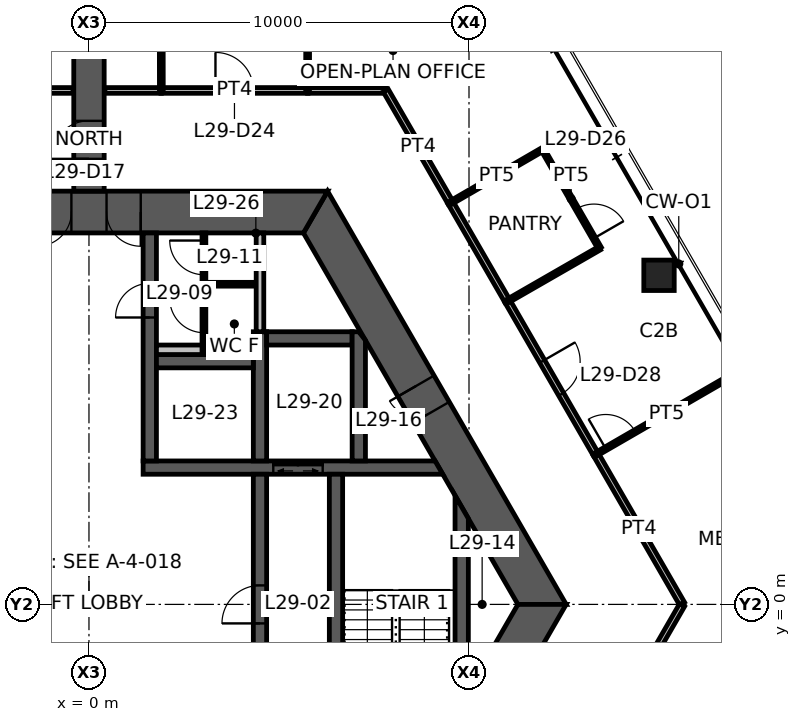
"""IFC4 building model, lengths in metres.
Left out: names, types, materials, properties, quantities, classifications, styles, units other than length and angle.
Written with IfcOpenShell. Run it as: python <this file> out.ifc"""

import sys

from ifc_helpers import new_model, si_unit, direction, frame, frame_2d, origin, origin_2d, place, context, subcontext, project, spatial, polyline, rectangle, hollow_rectangle, outline, extrude, element, fill, save


model = new_model("IFC4")
c1 = context("Model", 3, precision=1e-05, world=origin(), true_north=direction((0.0, 1.0)))
c2 = subcontext(c1, "Body", "Model", "MODEL_VIEW")
j1 = project(units=[si_unit("LENGTHUNIT", "METRE"), si_unit("PLANEANGLEUNIT", "RADIAN")], contexts=[c1])
p1 = place(None, origin())
s1 = spatial("IfcSite", under=j1, at=p1, CompositionType="ELEMENT")
p2 = place(p1, origin())
s2 = spatial("IfcBuilding", under=s1, at=p2, CompositionType="ELEMENT")
p3 = place(p2, frame((0.0, 0.0, 115.8)))
s3 = spatial("IfcBuildingStorey", under=s2, at=p3, CompositionType="ELEMENT", Elevation=115.8)
p4 = place(p3, frame((15.0, 8.66, 0.0), z_axis=(0.0, 0.0, 1.0), x_axis=(1.0, 0.0, 0.0)))
e1 = element("IfcColumn", 1, at=p4, inside=s3, PredefinedType="COLUMN", context=c2, shape_type="SweptSolid", body=[
    extrude(hollow_rectangle(XDim=0.8, YDim=0.8, WallThickness=0.045, at=origin_2d()), origin(), (0.0, 0.0, 1.0), 3.9),
])
p5 = place(p3, frame((11.922, 0.0, 0.0), z_axis=(0.0, 0.0, 1.0), x_axis=(-0.500004296715, 0.866022923061, 0.0)))
e2 = element("IfcWall", 2, at=p5, inside=s3, PredefinedType="SHEAR", context=c2, shape_type="SweptSolid", body=[
    extrude(outline(polyline([(-0.318, -0.55), (5.835, -0.55), (6.635, -0.55), (12.24, -0.55), (11.605, 0.55), (6.635, 0.55), (5.835, 0.55), (0.318, 0.55), (-0.318, -0.55)])), origin(), (0.0, 0.0, 1.0), 3.9),
])
p6 = place(p5, frame((5.835, 0.0, 0.0)))
e3 = element("IfcOpeningElement", 3, at=p6, cuts=e2, PredefinedType="OPENING", context=c2, shape_type="SweptSolid", body=[
    extrude(rectangle(XDim=0.8, YDim=2.1, at=frame_2d((0.4, 1.05))), frame((0.0, 0.56, 0.0), z_axis=(0.0, -1.0, 0.0), x_axis=(1.0, 0.0, 0.0)), (0.0, 0.0, 1.0), 1.12),
])
p7 = place(p3, frame((5.961, 10.325, 0.0), z_axis=(0.0, 0.0, 1.0), x_axis=(-1.0, 0.0, 0.0)))
e4 = element("IfcWall", 4, at=p7, inside=s3, PredefinedType="SHEAR", context=c2, shape_type="SweptSolid", body=[
    extrude(outline(polyline([(-0.318, -0.55), (4.599, -0.55), (5.499, -0.55), (6.424, -0.55), (7.323, -0.55), (12.24, -0.55), (11.605, 0.55), (7.323, 0.55), (6.424, 0.55), (5.499, 0.55), (4.599, 0.55), (0.318, 0.55), (-0.318, -0.55)])), origin(), (0.0, 0.0, 1.0), 3.9),
])
p8 = place(p7, frame((6.424, 0.0, 0.0)))
e5 = element("IfcOpeningElement", 5, at=p8, cuts=e4, PredefinedType="OPENING", context=c2, shape_type="SweptSolid", body=[
    extrude(rectangle(XDim=0.9, YDim=2.1, at=frame_2d((0.45, 1.05))), frame((0.0, 0.56, 0.0), z_axis=(0.0, -1.0, 0.0), x_axis=(1.0, 0.0, 0.0)), (0.0, 0.0, 1.0), 1.12),
])
p9 = place(p7, frame((4.599, 0.0, 0.0)))
e6 = element("IfcOpeningElement", 6, at=p9, cuts=e4, PredefinedType="OPENING", context=c2, shape_type="SweptSolid", body=[
    extrude(rectangle(XDim=0.9, YDim=2.1, at=frame_2d((0.45, 1.05))), frame((0.0, 0.56, 0.0), z_axis=(0.0, -1.0, 0.0), x_axis=(1.0, 0.0, 0.0)), (0.0, 0.0, 1.0), 1.12),
])
p10 = place(p3, frame((5.961, -10.325, 0.0), z_axis=(0.0, 0.0, 1.0), x_axis=(0.500004296715, 0.866022923061, 0.0)))
e7 = element("IfcWall", 7, at=p10, inside=s3, PredefinedType="SHEAR", context=c2, shape_type="SweptSolid", body=[
    extrude(outline(polyline([(-0.318, -0.55), (4.594, -0.55), (5.394, -0.55), (12.24, -0.55), (11.605, 0.55), (5.394, 0.55), (4.594, 0.55), (0.318, 0.55), (-0.318, -0.55)])), origin(), (0.0, 0.0, 1.0), 3.9),
])
p11 = place(p10, frame((4.594, 0.0, 0.0)))
e8 = element("IfcOpeningElement", 8, at=p11, cuts=e7, PredefinedType="OPENING", context=c2, shape_type="SweptSolid", body=[
    extrude(rectangle(XDim=0.8, YDim=2.1, at=frame_2d((0.4, 1.05))), frame((0.0, 0.56, 0.0), z_axis=(0.0, -1.0, 0.0), x_axis=(1.0, 0.0, 0.0)), (0.0, 0.0, 1.0), 1.12),
])
p12 = place(p3, frame((0.0, 10.875, 0.0), z_axis=(0.0, 0.0, 1.0), x_axis=(0.0, 1.0, 0.0)))
e9 = element("IfcWall", 9, at=p12, inside=s3, PredefinedType="SHEAR", context=c2, shape_type="SweptSolid", body=[
    extrude(rectangle(XDim=7.646, YDim=0.8, at=frame_2d((3.823, 0.0))), origin(), (0.0, 0.0, 1.0), 3.9),
])
p13 = place(p12, frame((0.85, 0.0, 0.0)))
e10 = element("IfcOpeningElement", 10, at=p13, cuts=e9, PredefinedType="OPENING", context=c2, shape_type="SweptSolid", body=[
    extrude(rectangle(XDim=1.0, YDim=2.1, at=frame_2d((0.5, 1.05))), frame((0.0, 0.41, 0.0), z_axis=(0.0, -1.0, 0.0), x_axis=(1.0, 0.0, 0.0)), (0.0, 0.0, 1.0), 0.82),
])
p14 = place(p3, frame((1.425, 3.6, 0.0), z_axis=(0.0, 0.0, 1.0), x_axis=(1.0, 0.0, 0.0)))
e11 = element("IfcWall", 11, at=p14, inside=s3, PredefinedType="SHEAR", context=c2, shape_type="SweptSolid", body=[
    extrude(outline(polyline([(0.0, -0.175), (3.425, -0.175), (4.725, -0.175), (7.885, -0.175), (7.683, 0.175), (4.725, 0.175), (3.425, 0.175), (0.0, 0.175), (0.0, -0.175)])), origin(), (0.0, 0.0, 1.0), 3.9),
])
p15 = place(p14, frame((3.425, 0.0, 0.0)))
e12 = element("IfcOpeningElement", 12, at=p15, cuts=e11, PredefinedType="OPENING", context=c2, shape_type="SweptSolid", body=[
    extrude(rectangle(XDim=1.3, YDim=2.1, at=frame_2d((0.65, 1.05))), frame((0.0, 0.185, 0.0), z_axis=(0.0, -1.0, 0.0), x_axis=(1.0, 0.0, 0.0)), (0.0, 0.0, 1.0), 0.37),
])
p16 = place(p3, frame((1.6, 3.775, 0.0), z_axis=(0.0, 0.0, 1.0), x_axis=(0.0, 1.0, 0.0)))
e13 = element("IfcWall", 13, at=p16, inside=s3, PredefinedType="SHEAR", context=c2, shape_type="SweptSolid", body=[
    extrude(rectangle(XDim=6.0, YDim=0.35, at=frame_2d((3.0, 0.0))), origin(), (0.0, 0.0, 1.0), 3.9),
])
p17 = place(p16, frame((3.775, 0.0, 0.0)))
e14 = element("IfcOpeningElement", 14, at=p17, cuts=e13, PredefinedType="OPENING", context=c2, shape_type="SweptSolid", body=[
    extrude(rectangle(XDim=0.9, YDim=2.1, at=frame_2d((0.45, 1.05))), frame((0.0, 0.185, 0.0), z_axis=(0.0, -1.0, 0.0), x_axis=(1.0, 0.0, 0.0)), (0.0, 0.0, 1.0), 0.37),
])
p18 = place(p3, frame((4.5, -3.425, 0.0), z_axis=(0.0, 0.0, 1.0), x_axis=(0.0, 1.0, 0.0)))
e15 = element("IfcWall", 15, at=p18, inside=s3, PredefinedType="SHEAR", context=c2, shape_type="SweptSolid", body=[
    extrude(rectangle(XDim=6.85, YDim=0.35, at=frame_2d((3.425, 0.0))), origin(), (0.0, 0.0, 1.0), 3.9),
])
p19 = place(p18, frame((2.925, 0.0, 0.0)))
e16 = element("IfcOpeningElement", 16, at=p19, cuts=e15, PredefinedType="OPENING", context=c2, shape_type="SweptSolid", body=[
    extrude(rectangle(XDim=1.0, YDim=2.1, at=frame_2d((0.5, 1.05))), frame((0.0, 0.185, 0.0), z_axis=(0.0, -1.0, 0.0), x_axis=(1.0, 0.0, 0.0)), (0.0, 0.0, 1.0), 0.37),
])
p20 = place(p3, frame((6.5, -3.425, 0.0), z_axis=(0.0, 0.0, 1.0), x_axis=(0.0, 1.0, 0.0)))
e17 = element("IfcWall", 17, at=p20, inside=s3, PredefinedType="SHEAR", context=c2, shape_type="SweptSolid", body=[
    extrude(rectangle(XDim=6.85, YDim=0.35, at=frame_2d((3.425, 0.0))), origin(), (0.0, 0.0, 1.0), 3.9),
])
p21 = place(p20, frame((0.1, 0.0, 0.0)))
e18 = element("IfcOpeningElement", 18, at=p21, cuts=e17, PredefinedType="OPENING", context=c2, shape_type="SweptSolid", body=[
    extrude(rectangle(XDim=1.0, YDim=2.1, at=frame_2d((0.5, 1.05))), frame((0.0, 0.185, 0.0), z_axis=(0.0, -1.0, 0.0), x_axis=(1.0, 0.0, 0.0)), (0.0, 0.0, 1.0), 0.37),
])
p22 = place(p3, frame((4.5, 3.775, 0.0), z_axis=(0.0, 0.0, 1.0), x_axis=(0.0, 1.0, 0.0)))
e19 = element("IfcWall", 19, at=p22, inside=s3, PredefinedType="SHEAR", context=c2, shape_type="SweptSolid", body=[
    extrude(rectangle(XDim=3.4, YDim=0.35, at=frame_2d((1.7, 0.0))), origin(), (0.0, 0.0, 1.0), 3.9),
])
p23 = place(p3, frame((1.775, 6.4, 0.0), z_axis=(0.0, 0.0, 1.0), x_axis=(1.0, 0.0, 0.0)))
e20 = element("IfcWall", 20, at=p23, inside=s3, PredefinedType="SHEAR", context=c2, shape_type="SweptSolid", body=[
    extrude(rectangle(XDim=2.55, YDim=0.35, at=frame_2d((1.275, 0.0))), origin(), (0.0, 0.0, 1.0), 3.9),
])
p24 = place(p3, frame((4.675, 7.0, 0.0), z_axis=(0.0, 0.0, 1.0), x_axis=(1.0, 0.0, 0.0)))
e21 = element("IfcWall", 21, at=p24, inside=s3, PredefinedType="SHEAR", context=c2, shape_type="SweptSolid", body=[
    extrude(rectangle(XDim=2.25, YDim=0.35, at=frame_2d((1.125, 0.0))), origin(), (0.0, 0.0, 1.0), 3.9),
])
p25 = place(p3, frame((7.1, 3.775, 0.0), z_axis=(0.0, 0.0, 1.0), x_axis=(0.0, 1.0, 0.0)))
e22 = element("IfcWall", 22, at=p25, inside=s3, PredefinedType="SHEAR", context=c2, shape_type="SweptSolid", body=[
    extrude(outline(polyline([(0.0, -0.175), (3.175, -0.175), (3.4, 0.0), (3.4, 0.175), (0.0, 0.175), (0.0, -0.175)])), origin(), (0.0, 0.0, 1.0), 3.9),
])
p26 = place(p3, frame((9.808, -2.562, 0.0), z_axis=(0.0, 0.0, 1.0), x_axis=(0.0, 1.0, 0.0)))
e23 = element("IfcWall", 23, at=p26, inside=s3, PredefinedType="SHEAR", context=c2, shape_type="SweptSolid", body=[
    extrude(outline(polyline([(0.303, -0.175), (4.821, -0.175), (5.428, 0.175), (-0.303, 0.175), (0.303, -0.175)])), origin(), (0.0, 0.0, 1.0), 3.9),
])
p27 = place(p3, frame((4.5, 7.175, 0.0), z_axis=(0.0, 0.0, 1.0), x_axis=(0.0, 1.0, 0.0)))
e24 = element("IfcWall", 24, at=p27, inside=s3, PredefinedType="STANDARD", context=c2, shape_type="SweptSolid", body=[
    extrude(rectangle(XDim=2.6, YDim=0.2, at=frame_2d((1.3, 0.0))), origin(), (0.0, 0.0, 1.0), 3.9),
])
p28 = place(p3, frame((1.775, 6.7, 0.0), z_axis=(0.0, 0.0, 1.0), x_axis=(1.0, 0.0, 0.0)))
e25 = element("IfcWall", 25, at=p28, inside=s3, PredefinedType="PLUMBINGWALL", context=c2, shape_type="SweptSolid", body=[
    extrude(rectangle(XDim=2.55, YDim=0.25, at=frame_2d((1.275, 0.0))), origin(), (0.0, 0.0, 1.0), 3.9),
])
p29 = place(p3, frame((3.025, 6.575, 0.0), z_axis=(0.0, 0.0, 1.0), x_axis=(0.0, 1.0, 0.0)))
e26 = element("IfcWall", 26, at=p29, inside=s3, PredefinedType="PARTITIONING", context=c2, shape_type="SweptSolid", body=[
    extrude(rectangle(XDim=3.2, YDim=0.1, at=frame_2d((1.6, 0.0))), origin(), (0.0, 0.0, 1.0), 2.95),
])
p30 = place(p29, frame((0.575, 0.0, 0.0)))
e27 = element("IfcOpeningElement", 27, at=p30, cuts=e26, PredefinedType="OPENING", context=c2, shape_type="SweptSolid", body=[
    extrude(rectangle(XDim=0.9, YDim=2.1, at=frame_2d((0.45, 1.05))), frame((0.0, 0.06, 0.0), z_axis=(0.0, -1.0, 0.0), x_axis=(1.0, 0.0, 0.0)), (0.0, 0.0, 1.0), 0.12),
])
p31 = place(p29, frame((2.1, 0.0, 0.0)))
e28 = element("IfcOpeningElement", 28, at=p31, cuts=e26, PredefinedType="OPENING", context=c2, shape_type="SweptSolid", body=[
    extrude(rectangle(XDim=0.9, YDim=2.1, at=frame_2d((0.45, 1.05))), frame((0.0, 0.06, 0.0), z_axis=(0.0, -1.0, 0.0), x_axis=(1.0, 0.0, 0.0)), (0.0, 0.0, 1.0), 0.12),
])
p32 = place(p3, frame((3.075, 8.425, 0.0), z_axis=(0.0, 0.0, 1.0), x_axis=(1.0, 0.0, 0.0)))
e29 = element("IfcWall", 29, at=p32, inside=s3, PredefinedType="PARTITIONING", context=c2, shape_type="SweptSolid", body=[
    extrude(rectangle(XDim=1.25, YDim=0.1, at=frame_2d((0.625, 0.0))), origin(), (0.0, 0.0, 1.0), 2.95),
])
p33 = place(p3, frame((1.895, 13.525, 0.0), z_axis=(0.0, 0.0, 1.0), x_axis=(1.0, 0.0, 0.0)))
e30 = element("IfcWall", 30, at=p33, inside=s3, PredefinedType="PARTITIONING", context=c2, shape_type="SweptSolid", body=[
    extrude(rectangle(XDim=3.867, YDim=0.15, at=frame_2d((1.934, 0.0))), origin(), (0.0, 0.0, 1.0), 2.95),
])
p34 = place(p33, frame((1.434, 0.0, 0.0)))
e31 = element("IfcOpeningElement", 31, at=p34, cuts=e30, PredefinedType="OPENING", context=c2, shape_type="SweptSolid", body=[
    extrude(rectangle(XDim=1.0, YDim=2.1, at=frame_2d((0.5, 1.05))), frame((0.0, 0.085, 0.0), z_axis=(0.0, -1.0, 0.0), x_axis=(1.0, 0.0, 0.0)), (0.0, 0.0, 1.0), 0.17),
])
p35 = place(p3, frame((9.51, 10.577, 0.0), z_axis=(0.0, 0.0, 1.0), x_axis=(0.499977562641, -0.866038357612, 0.0)))
e32 = element("IfcWall", 32, at=p35, inside=s3, PredefinedType="PARTITIONING", context=c2, shape_type="SweptSolid", body=[
    extrude(rectangle(XDim=3.01, YDim=0.15, at=frame_2d((1.505, 0.0))), origin(), (0.0, 0.0, 1.0), 2.95),
])
p36 = place(p3, frame((13.334, 3.955, 0.0), z_axis=(0.0, 0.0, 1.0), x_axis=(0.499987549055, -0.866032592222, 0.0)))
e33 = element("IfcWall", 33, at=p36, inside=s3, PredefinedType="PARTITIONING", context=c2, shape_type="SweptSolid", body=[
    extrude(rectangle(XDim=4.544, YDim=0.15, at=frame_2d((2.272, 0.0))), origin(), (0.0, 0.0, 1.0), 2.95),
])
p37 = place(p3, frame((0.42, 13.525, 0.0), z_axis=(0.0, 0.0, 1.0), x_axis=(1.0, 0.0, 0.0)))
e34 = element("IfcWall", 34, at=p37, inside=s3, PredefinedType="PARTITIONING", context=c2, shape_type="SweptSolid", body=[
    extrude(rectangle(XDim=1.485, YDim=0.15, at=frame_2d((0.742, 0.0))), origin(), (0.0, 0.0, 1.0), 2.95),
])
p38 = place(p3, frame((5.752, 13.525, 0.0), z_axis=(0.0, 0.0, 1.0), x_axis=(1.0, 0.0, 0.0)))
e35 = element("IfcWall", 35, at=p38, inside=s3, PredefinedType="PARTITIONING", context=c2, shape_type="SweptSolid", body=[
    extrude(rectangle(XDim=2.056, YDim=0.15, at=frame_2d((1.028, 0.0))), origin(), (0.0, 0.0, 1.0), 2.95),
])
p39 = place(p3, frame((7.809, 13.525, 0.0), z_axis=(0.0, 0.0, 1.0), x_axis=(0.500001088571, -0.866024775297, 0.0)))
e36 = element("IfcWall", 36, at=p39, inside=s3, PredefinedType="PARTITIONING", context=c2, shape_type="SweptSolid", body=[
    extrude(rectangle(XDim=3.413, YDim=0.15, at=frame_2d((1.707, 0.0))), origin(), (0.0, 0.0, 1.0), 2.95),
])
p40 = place(p3, frame((11.011, 7.979, 0.0), z_axis=(0.0, 0.0, 1.0), x_axis=(0.500008456887, -0.866020521143, 0.0)))
e37 = element("IfcWall", 37, at=p40, inside=s3, PredefinedType="PARTITIONING", context=c2, shape_type="SweptSolid", body=[
    extrude(rectangle(XDim=4.655, YDim=0.15, at=frame_2d((2.328, 0.0))), origin(), (0.0, 0.0, 1.0), 2.95),
])
p41 = place(p40, frame((1.828, 0.0, 0.0)))
e38 = element("IfcOpeningElement", 38, at=p41, cuts=e37, PredefinedType="OPENING", context=c2, shape_type="SweptSolid", body=[
    extrude(rectangle(XDim=1.0, YDim=2.1, at=frame_2d((0.5, 1.05))), frame((0.0, 0.085, 0.0), z_axis=(0.0, -1.0, 0.0), x_axis=(1.0, 0.0, 0.0)), (0.0, 0.0, 1.0), 0.17),
])
for number, where, z_axis, x_axis in (
    (39, (1.905, 13.525, 0.0), (0.0, 0.0, 1.0), (-0.002, 1.0, 0.0)),
    (40, (5.757, 16.325, 0.0), (0.0, 0.0, 1.0), (-0.002, -1.0, 0.0)),
    (41, (9.515, 10.569, 0.0), (0.0, 0.0, 1.0), (0.865, 0.501, 0.0)),
):
    element("IfcWall", number, at=place(p3, frame(where, z_axis=z_axis, x_axis=x_axis)), inside=s3, PredefinedType="PARTITIONING", context=c2, shape_type="SweptSolid", body=[
        extrude(rectangle(XDim=2.8, YDim=0.1, at=frame_2d((1.4, 0.0))), origin(), (0.0, 0.0, 1.0), 2.95),
    ])
p42 = place(p3, frame((11.938, 11.973, 0.0), z_axis=(0.0, 0.0, 1.0), x_axis=(0.50002537861, -0.866010750942, 0.0)))
e42 = element("IfcWall", 42, at=p42, inside=s3, PredefinedType="PARTITIONING", context=c2, shape_type="SweptSolid", body=[
    extrude(rectangle(XDim=3.0, YDim=0.1, at=frame_2d((1.5, 0.0))), origin(), (0.0, 0.0, 1.0), 2.95),
])
p43 = place(p42, frame((1.8, 0.0, 0.0)))
e43 = element("IfcOpeningElement", 43, at=p43, cuts=e42, PredefinedType="OPENING", context=c2, shape_type="SweptSolid", body=[
    extrude(rectangle(XDim=0.9, YDim=2.1, at=frame_2d((0.45, 1.05))), frame((0.0, 0.06, 0.0), z_axis=(0.0, -1.0, 0.0), x_axis=(1.0, 0.0, 0.0)), (0.0, 0.0, 1.0), 0.12),
])
p44 = place(p3, frame((13.438, 9.375, 0.0), z_axis=(0.0, 0.0, 1.0), x_axis=(-0.866817750494, -0.498625097071, 0.0)))
e44 = element("IfcWall", 44, at=p44, inside=s3, PredefinedType="PARTITIONING", context=c2, shape_type="SweptSolid", body=[
    extrude(rectangle(XDim=2.8, YDim=0.1, at=frame_2d((1.4, 0.0))), origin(), (0.0, 0.0, 1.0), 2.95),
])
p45 = place(p3, frame((13.338, 3.947, 0.0), z_axis=(0.0, 0.0, 1.0), x_axis=(0.865505397626, 0.500899597405, 0.0)))
e45 = element("IfcWall", 45, at=p45, inside=s3, PredefinedType="PARTITIONING", context=c2, shape_type="SweptSolid", body=[
    extrude(rectangle(XDim=4.295, YDim=0.1, at=frame_2d((2.148, 0.0))), origin(), (0.0, 0.0, 1.0), 2.95),
])
p46 = place(p45, frame((0.3, 0.0, 0.0)))
e46 = element("IfcOpeningElement", 46, at=p46, cuts=e45, PredefinedType="OPENING", context=c2, shape_type="SweptSolid", body=[
    extrude(rectangle(XDim=0.9, YDim=2.1, at=frame_2d((0.45, 1.05))), frame((0.0, 0.06, 0.0), z_axis=(0.0, -1.0, 0.0), x_axis=(1.0, 0.0, 0.0)), (0.0, 0.0, 1.0), 0.12),
])
p47 = place(p3, frame((-1.905, 13.525, 0.0), z_axis=(0.0, 0.0, 1.0), x_axis=(1.0, 0.0, 0.0)))
e47 = element("IfcWall", 47, at=p47, inside=s3, PredefinedType="PARTITIONING", context=c2, shape_type="SweptSolid", body=[
    extrude(rectangle(XDim=1.485, YDim=0.15, at=frame_2d((0.742, 0.0))), origin(), (0.0, 0.0, 1.0), 2.95),
])
p48 = place(p3, frame((15.606, -0.02, 0.0), z_axis=(0.0, 0.0, 1.0), x_axis=(-0.499989298045, -0.866031582473, 0.0)))
e48 = element("IfcWall", 48, at=p48, inside=s3, PredefinedType="PARTITIONING", context=c2, shape_type="SweptSolid", body=[
    extrude(rectangle(XDim=7.365, YDim=0.15, at=frame_2d((3.683, 0.0))), origin(), (0.0, 0.0, 1.0), 2.95),
])
p49 = place(p48, frame((3.183, 0.0, 0.0)))
e49 = element("IfcOpeningElement", 49, at=p49, cuts=e48, PredefinedType="OPENING", context=c2, shape_type="SweptSolid", body=[
    extrude(rectangle(XDim=1.0, YDim=2.1, at=frame_2d((0.5, 1.05))), frame((0.0, 0.085, 0.0), z_axis=(0.0, -1.0, 0.0), x_axis=(1.0, 0.0, 0.0)), (0.0, 0.0, 1.0), 0.17),
])
p50 = place(p8, origin())
e50 = element("IfcDoor", 50, at=p50, inside=s3, OperationType="SINGLE_SWING_RIGHT", PredefinedType="DOOR", context=c2, shape_type="SweptSolid", body=[
    extrude(rectangle(XDim=0.9, YDim=2.1, at=frame_2d((0.45, 1.05))), frame((0.0, 0.025, 0.0), z_axis=(0.0, -1.0, 0.0), x_axis=(1.0, 0.0, 0.0)), (0.0, 0.0, 1.0), 0.05),
])
fill(e5, e50)
p51 = place(p9, origin())
e51 = element("IfcDoor", 51, at=p51, inside=s3, OperationType="SINGLE_SWING_LEFT", PredefinedType="DOOR", context=c2, shape_type="SweptSolid", body=[
    extrude(rectangle(XDim=0.9, YDim=2.1, at=frame_2d((0.45, 1.05))), frame((0.0, 0.025, 0.0), z_axis=(0.0, -1.0, 0.0), x_axis=(1.0, 0.0, 0.0)), (0.0, 0.0, 1.0), 0.05),
])
fill(e6, e51)
p52 = place(p6, origin())
e52 = element("IfcDoor", 52, at=p52, inside=s3, OperationType="SINGLE_SWING_RIGHT", PredefinedType="DOOR", context=c2, shape_type="SweptSolid", body=[
    extrude(rectangle(XDim=0.8, YDim=2.1, at=frame_2d((0.4, 1.05))), frame((0.0, 0.025, 0.0), z_axis=(0.0, -1.0, 0.0), x_axis=(1.0, 0.0, 0.0)), (0.0, 0.0, 1.0), 0.05),
])
fill(e3, e52)
p53 = place(p19, origin())
e53 = element("IfcDoor", 53, at=p53, inside=s3, OperationType="SINGLE_SWING_LEFT", PredefinedType="DOOR", context=c2, shape_type="SweptSolid", body=[
    extrude(rectangle(XDim=1.0, YDim=2.1, at=frame_2d((0.5, 1.05))), frame((0.0, 0.025, 0.0), z_axis=(0.0, -1.0, 0.0), x_axis=(1.0, 0.0, 0.0)), (0.0, 0.0, 1.0), 0.05),
])
fill(e16, e53)
p54 = place(p17, origin())
e54 = element("IfcDoor", 54, at=p54, inside=s3, OperationType="SINGLE_SWING_LEFT", PredefinedType="DOOR", context=c2, shape_type="SweptSolid", body=[
    extrude(rectangle(XDim=0.9, YDim=2.1, at=frame_2d((0.45, 1.05))), frame((0.0, 0.025, 0.0), z_axis=(0.0, -1.0, 0.0), x_axis=(1.0, 0.0, 0.0)), (0.0, 0.0, 1.0), 0.05),
])
fill(e14, e54)
p55 = place(p13, origin())
e55 = element("IfcDoor", 55, at=p55, inside=s3, OperationType="SINGLE_SWING_LEFT", PredefinedType="DOOR", context=c2, shape_type="SweptSolid", body=[
    extrude(rectangle(XDim=1.0, YDim=2.1, at=frame_2d((0.5, 1.05))), frame((0.0, 0.025, 0.0), z_axis=(0.0, -1.0, 0.0), x_axis=(1.0, 0.0, 0.0)), (0.0, 0.0, 1.0), 0.05),
])
fill(e10, e55)
p56 = place(p30, origin())
e56 = element("IfcDoor", 56, at=p56, inside=s3, OperationType="SINGLE_SWING_RIGHT", PredefinedType="DOOR", context=c2, shape_type="SweptSolid", body=[
    extrude(rectangle(XDim=0.9, YDim=2.1, at=frame_2d((0.45, 1.05))), frame((0.0, 0.025, 0.0), z_axis=(0.0, -1.0, 0.0), x_axis=(1.0, 0.0, 0.0)), (0.0, 0.0, 1.0), 0.05),
])
fill(e27, e56)
p57 = place(p31, origin())
e57 = element("IfcDoor", 57, at=p57, inside=s3, OperationType="SINGLE_SWING_RIGHT", PredefinedType="DOOR", context=c2, shape_type="SweptSolid", body=[
    extrude(rectangle(XDim=0.9, YDim=2.1, at=frame_2d((0.45, 1.05))), frame((0.0, 0.025, 0.0), z_axis=(0.0, -1.0, 0.0), x_axis=(1.0, 0.0, 0.0)), (0.0, 0.0, 1.0), 0.05),
])
fill(e28, e57)
p58 = place(p34, origin())
e58 = element("IfcDoor", 58, at=p58, inside=s3, OperationType="SINGLE_SWING_LEFT", PredefinedType="DOOR", context=c2, shape_type="SweptSolid", body=[
    extrude(rectangle(XDim=1.0, YDim=2.1, at=frame_2d((0.5, 1.05))), frame((0.0, 0.025, 0.0), z_axis=(0.0, -1.0, 0.0), x_axis=(1.0, 0.0, 0.0)), (0.0, 0.0, 1.0), 0.05),
])
fill(e31, e58)
p59 = place(p41, origin())
e59 = element("IfcDoor", 59, at=p59, inside=s3, OperationType="SINGLE_SWING_LEFT", PredefinedType="DOOR", context=c2, shape_type="SweptSolid", body=[
    extrude(rectangle(XDim=1.0, YDim=2.1, at=frame_2d((0.5, 1.05))), frame((0.0, 0.025, 0.0), z_axis=(0.0, -1.0, 0.0), x_axis=(1.0, 0.0, 0.0)), (0.0, 0.0, 1.0), 0.05),
])
fill(e38, e59)
p60 = place(p43, origin())
e60 = element("IfcDoor", 60, at=p60, inside=s3, OperationType="SINGLE_SWING_RIGHT", PredefinedType="DOOR", context=c2, shape_type="SweptSolid", body=[
    extrude(rectangle(XDim=0.9, YDim=2.1, at=frame_2d((0.45, 1.05))), frame((0.0, 0.025, 0.0), z_axis=(0.0, -1.0, 0.0), x_axis=(1.0, 0.0, 0.0)), (0.0, 0.0, 1.0), 0.05),
])
fill(e43, e60)
p61 = place(p46, origin())
e61 = element("IfcDoor", 61, at=p61, inside=s3, OperationType="SINGLE_SWING_LEFT", PredefinedType="DOOR", context=c2, shape_type="SweptSolid", body=[
    extrude(rectangle(XDim=0.9, YDim=2.1, at=frame_2d((0.45, 1.05))), frame((0.0, 0.025, 0.0), z_axis=(0.0, -1.0, 0.0), x_axis=(1.0, 0.0, 0.0)), (0.0, 0.0, 1.0), 0.05),
])
fill(e46, e61)
p62 = place(p15, origin())
e62 = element("IfcDoor", 62, at=p62, inside=s3, OperationType="DOUBLE_DOOR_SLIDING", PredefinedType="DOOR", context=c2, shape_type="SweptSolid", body=[
    extrude(rectangle(XDim=1.3, YDim=2.1, at=frame_2d((0.65, 1.05))), frame((0.0, 0.025, 0.0), z_axis=(0.0, -1.0, 0.0), x_axis=(1.0, 0.0, 0.0)), (0.0, 0.0, 1.0), 0.05),
])
fill(e12, e62)
save(model, sys.argv[1])
